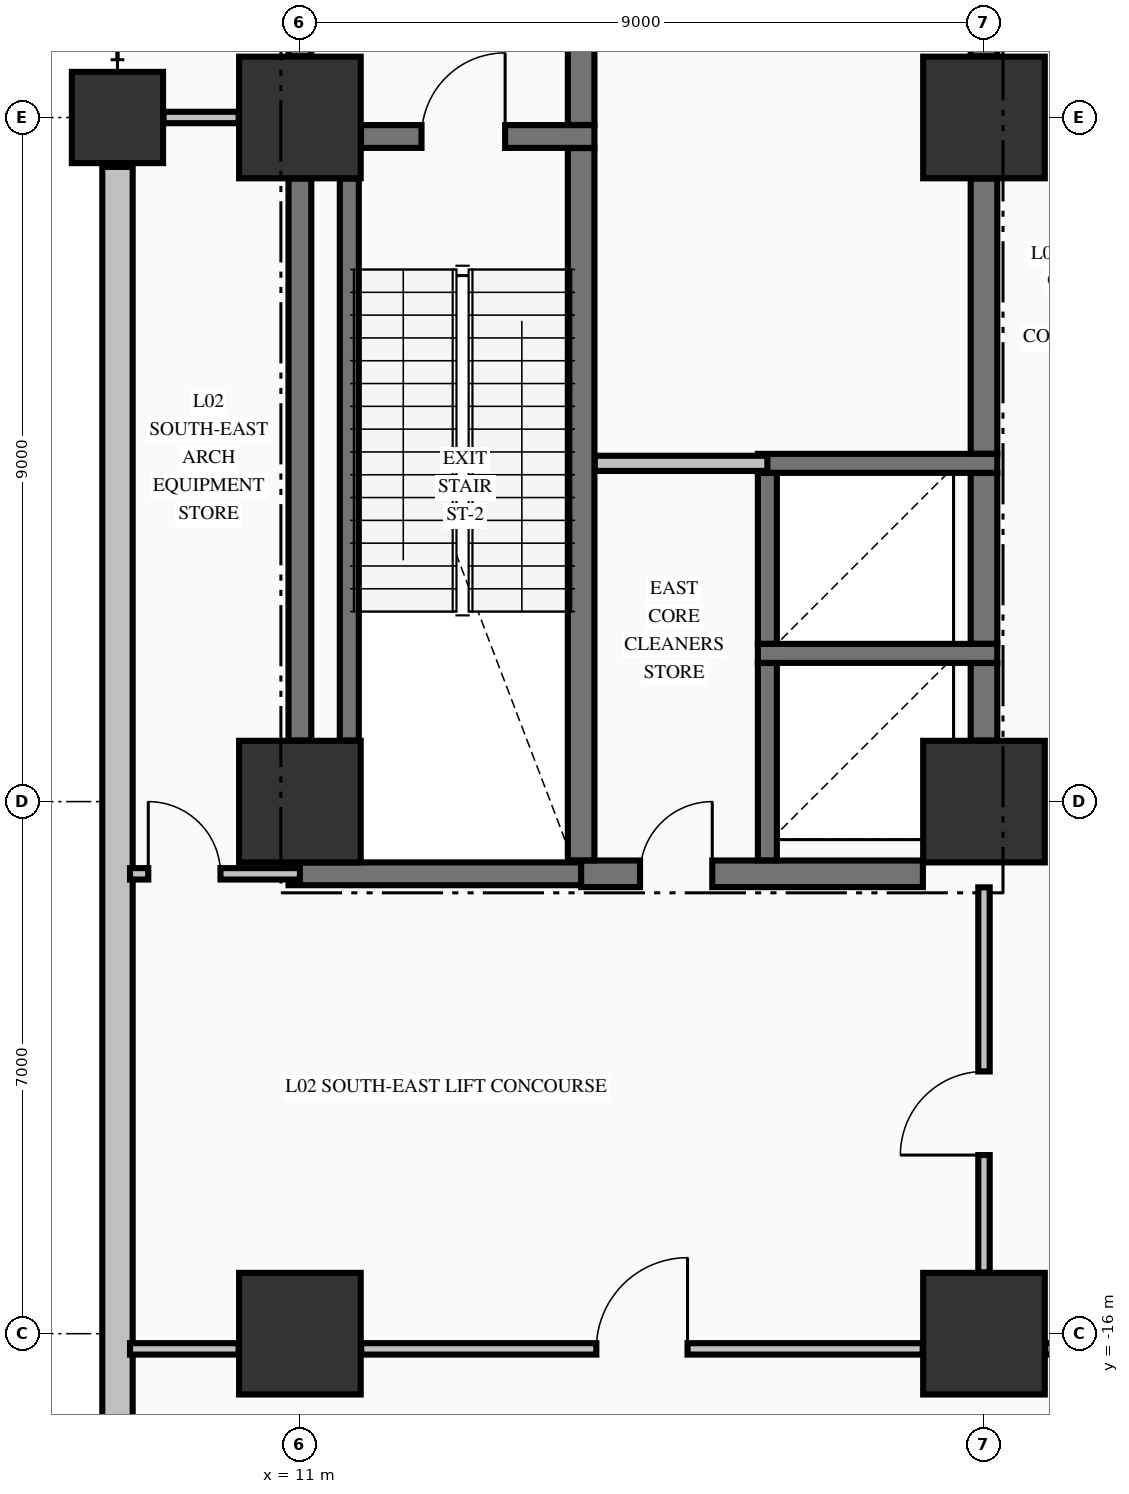
"""IFC4 building model, lengths in metres.
Left out: names, types, materials, properties, quantities, classifications, styles, units other than length and angle.
Written with IfcOpenShell. Run it as: python <this file> out.ifc"""

import sys

from ifc_helpers import new_model, si_unit, direction, frame, frame_2d, origin, origin_2d, place, context, subcontext, project, spatial, rectangle, extrude, element, fill, save


model = new_model("IFC4")
c1 = context("Model", 3, precision=1e-05, world=origin(), true_north=direction((0.0, 1.0)))
c2 = subcontext(c1, "Body", "Model", "MODEL_VIEW")
j1 = project(units=[si_unit("LENGTHUNIT", "METRE"), si_unit("PLANEANGLEUNIT", "RADIAN")], contexts=[c1])
p1 = place(None, origin())
s1 = spatial("IfcSite", under=j1, at=p1, CompositionType="ELEMENT")
p2 = place(p1, origin())
s2 = spatial("IfcBuilding", under=s1, at=p2, CompositionType="ELEMENT")
p3 = place(p2, frame((0.0, 0.0, 10.88)))
s3 = spatial("IfcBuildingStorey", under=s2, at=p3, CompositionType="ELEMENT", Elevation=10.88)
for number, where, z_axis, x_axis in (
    (1, (11.0, -16.0, 0.0), (0.0, 0.0, 1.0), (1.0, 0.0, 0.0)),
    (2, (11.0, -9.0, 0.0), (0.0, 0.0, 1.0), (1.0, 0.0, 0.0)),
    (3, (11.0, 0.0, 0.0), (0.0, 0.0, 1.0), (1.0, 0.0, 0.0)),
    (4, (20.0, -16.0, 0.0), (0.0, 0.0, 1.0), (1.0, 0.0, 0.0)),
    (5, (20.0, -9.0, 0.0), (0.0, 0.0, 1.0), (1.0, 0.0, 0.0)),
    (6, (20.0, 0.0, 0.0), (0.0, 0.0, 1.0), (1.0, 0.0, 0.0)),
):
    element("IfcColumn", number, at=place(p3, frame(where, z_axis=z_axis, x_axis=x_axis)), inside=s3, PredefinedType="COLUMN", context=c2, shape_type="SweptSolid", body=[
        extrude(rectangle(XDim=1.6, YDim=1.6, at=origin_2d()), origin(), (0.0, 0.0, 1.0), 5.09),
    ])
p4 = place(p3, frame((8.6, 0.0, 0.0), z_axis=(0.0, 0.0, 1.0), x_axis=(1.0, 0.0, 0.0)))
e7 = element("IfcColumn", 7, at=p4, inside=s3, PredefinedType="COLUMN", context=c2, shape_type="SweptSolid", body=[
    extrude(rectangle(XDim=1.2, YDim=1.2, at=origin_2d()), origin(), (0.0, 0.0, 1.0), 5.09),
])
p5 = place(p3, frame((8.6, -0.65, 0.0), z_axis=(0.0, 0.0, 1.0), x_axis=(0.0, -1.0, 0.0)))
e8 = element("IfcWall", 8, at=p5, inside=s3, PredefinedType="STANDARD", context=c2, shape_type="SweptSolid", body=[
    extrude(rectangle(XDim=24.72, YDim=0.4, at=frame_2d((12.36, 0.0))), origin(), (0.0, 0.0, 1.0), 4.132),
])
p6 = place(p3, frame((10.85, -9.95, 0.0), z_axis=(0.0, 0.0, 1.0), x_axis=(1.0, 0.0, 0.0)))
e9 = element("IfcWall", 9, at=p6, inside=s3, PredefinedType="SHEAR", context=c2, shape_type="SweptSolid", body=[
    extrude(rectangle(XDim=3.85, YDim=0.3, at=frame_2d((1.925, 0.0))), origin(), (0.0, 0.0, 1.0), 5.09),
])
p7 = place(p3, frame((14.7, -9.95, 0.0), z_axis=(0.0, 0.0, 1.0), x_axis=(1.0, 0.0, 0.0)))
e10 = element("IfcWall", 10, at=p7, inside=s3, PredefinedType="SHEAR", context=c2, shape_type="SweptSolid", body=[
    extrude(rectangle(XDim=4.496, YDim=0.35, at=frame_2d((2.248, 0.0))), origin(), (0.0, 0.0, 1.0), 5.09),
])
p8 = place(p7, frame((0.775, 0.0, 0.0)))
e11 = element("IfcOpeningElement", 11, at=p8, cuts=e10, PredefinedType="OPENING", context=c2, shape_type="SweptSolid", body=[
    extrude(rectangle(XDim=0.95, YDim=2.15, at=frame_2d((0.475, 1.075))), frame((0.0, 0.185, 0.0), z_axis=(0.0, -1.0, 0.0), x_axis=(1.0, 0.0, 0.0)), (0.0, 0.0, 1.0), 0.37),
])
for number, where, z_axis, x_axis in (
    (12, (17.025, -7.05, 0.0), (0.0, 0.0, 1.0), (1.0, 0.0, 0.0)),
    (13, (17.025, -4.55, 0.0), (0.0, 0.0, 1.0), (1.0, 0.0, 0.0)),
):
    element("IfcWall", number, at=place(p3, frame(where, z_axis=z_axis, x_axis=x_axis)), inside=s3, PredefinedType="SOLIDWALL", context=c2, shape_type="SweptSolid", body=[
        extrude(rectangle(XDim=3.15, YDim=0.25, at=frame_2d((1.575, 0.0))), origin(), (0.0, 0.0, 1.0), 5.09),
    ])
p9 = place(p3, frame((11.804, -0.25, 0.0), z_axis=(0.0, 0.0, 1.0), x_axis=(1.0, 0.0, 0.0)))
e14 = element("IfcWall", 14, at=p9, inside=s3, PredefinedType="SHEAR", context=c2, shape_type="SweptSolid", body=[
    extrude(rectangle(XDim=3.071, YDim=0.3, at=frame_2d((1.536, 0.0))), origin(), (0.0, 0.0, 1.0), 5.09),
])
p10 = place(p9, frame((0.796, 0.0, 0.0)))
e15 = element("IfcOpeningElement", 15, at=p10, cuts=e14, PredefinedType="OPENING", context=c2, shape_type="SweptSolid", body=[
    extrude(rectangle(XDim=1.1, YDim=2.15, at=frame_2d((0.55, 1.075))), frame((0.0, 0.16, 0.0), z_axis=(0.0, -1.0, 0.0), x_axis=(1.0, 0.0, 0.0)), (0.0, 0.0, 1.0), 0.32),
])
p11 = place(p3, frame((8.765, -16.2, 0.0), z_axis=(0.0, 0.0, 1.0), x_axis=(1.0, 0.0, 0.0)))
e16 = element("IfcWall", 16, at=p11, inside=s3, PredefinedType="PARTITIONING", context=c2, shape_type="SweptSolid", body=[
    extrude(rectangle(XDim=1.429, YDim=0.15, at=frame_2d((0.715, 0.0))), origin(), (0.0, 0.0, 1.0), 5.09),
])
p12 = place(p3, frame((11.806, -16.2, 0.0), z_axis=(0.0, 0.0, 1.0), x_axis=(1.0, 0.0, 0.0)))
e17 = element("IfcWall", 17, at=p12, inside=s3, PredefinedType="PARTITIONING", context=c2, shape_type="SweptSolid", body=[
    extrude(rectangle(XDim=7.388, YDim=0.15, at=frame_2d((3.694, 0.0))), origin(), (0.0, 0.0, 1.0), 4.132),
])
p13 = place(p12, frame((3.094, 0.0, 0.0)))
e18 = element("IfcOpeningElement", 18, at=p13, cuts=e17, PredefinedType="OPENING", context=c2, shape_type="SweptSolid", body=[
    extrude(rectangle(XDim=1.2, YDim=2.15, at=frame_2d((0.6, 1.075))), frame((0.0, 0.085, 0.0), z_axis=(0.0, -1.0, 0.0), x_axis=(1.0, 0.0, 0.0)), (0.0, 0.0, 1.0), 0.17),
])
p14 = place(p3, frame((20.806, -16.2, 0.0), z_axis=(0.0, 0.0, 1.0), x_axis=(1.0, 0.0, 0.0)))
e19 = element("IfcWall", 19, at=p14, inside=s3, PredefinedType="PARTITIONING", context=c2, shape_type="SweptSolid", body=[
    extrude(rectangle(XDim=4.488, YDim=0.15, at=frame_2d((2.244, 0.0))), origin(), (0.0, 0.0, 1.0), 4.132),
])
p15 = place(p14, frame((0.15, 0.0, 0.0)))
e20 = element("IfcOpeningElement", 20, at=p15, cuts=e19, PredefinedType="OPENING", context=c2, shape_type="SweptSolid", body=[
    extrude(rectangle(XDim=1.1, YDim=2.15, at=frame_2d((0.55, 1.075))), frame((0.0, 0.085, 0.0), z_axis=(0.0, -1.0, 0.0), x_axis=(1.0, 0.0, 0.0)), (0.0, 0.0, 1.0), 0.17),
])
p16 = place(p14, frame((2.844, 0.0, 0.0)))
e21 = element("IfcOpeningElement", 21, at=p16, cuts=e19, PredefinedType="OPENING", context=c2, shape_type="SweptSolid", body=[
    extrude(rectangle(XDim=1.1, YDim=2.15, at=frame_2d((0.55, 1.075))), frame((0.0, 0.085, 0.0), z_axis=(0.0, -1.0, 0.0), x_axis=(1.0, 0.0, 0.0)), (0.0, 0.0, 1.0), 0.17),
])
p17 = place(p3, frame((8.765, -9.95, 0.0), z_axis=(0.0, 0.0, 1.0), x_axis=(1.0, 0.0, 0.0)))
e22 = element("IfcWall", 22, at=p17, inside=s3, PredefinedType="PARTITIONING", context=c2, shape_type="SweptSolid", body=[
    extrude(rectangle(XDim=2.235, YDim=0.15, at=frame_2d((1.118, 0.0))), origin(), (0.0, 0.0, 1.0), 5.09),
])
p18 = place(p17, frame((0.24, 0.0, 0.0)))
e23 = element("IfcOpeningElement", 23, at=p18, cuts=e22, PredefinedType="OPENING", context=c2, shape_type="SweptSolid", body=[
    extrude(rectangle(XDim=0.95, YDim=2.15, at=frame_2d((0.475, 1.075))), frame((0.0, 0.085, 0.0), z_axis=(0.0, -1.0, 0.0), x_axis=(1.0, 0.0, 0.0)), (0.0, 0.0, 1.0), 0.17),
])
p19 = place(p3, frame((14.878, -4.55, 0.0), z_axis=(0.0, 0.0, 1.0), x_axis=(1.0, 0.0, 0.0)))
e24 = element("IfcWall", 24, at=p19, inside=s3, PredefinedType="PARTITIONING", context=c2, shape_type="SweptSolid", body=[
    extrude(rectangle(XDim=2.272, YDim=0.2, at=frame_2d((1.136, 0.0))), origin(), (0.0, 0.0, 1.0), 5.09),
])
p20 = place(p3, frame((9.206, 0.0, 0.0), z_axis=(0.0, 0.0, 1.0), x_axis=(1.0, 0.0, 0.0)))
e25 = element("IfcWall", 25, at=p20, inside=s3, PredefinedType="PARTITIONING", context=c2, shape_type="SweptSolid", body=[
    extrude(rectangle(XDim=0.988, YDim=0.15, at=frame_2d((0.494, 0.0))), origin(), (0.0, 0.0, 1.0), 4.132),
])
p21 = place(p3, frame((11.0, -8.196, 0.0), z_axis=(0.0, 0.0, 1.0), x_axis=(0.0, 1.0, 0.0)))
e26 = element("IfcWall", 26, at=p21, inside=s3, PredefinedType="SHEAR", context=c2, shape_type="SweptSolid", body=[
    extrude(rectangle(XDim=7.392, YDim=0.3, at=frame_2d((3.696, 0.0))), origin(), (0.0, 0.0, 1.0), 5.09),
])
p22 = place(p3, frame((11.0, 0.804, 0.0), z_axis=(0.0, 0.0, 1.0), x_axis=(0.0, 1.0, 0.0)))
e27 = element("IfcWall", 27, at=p22, inside=s3, PredefinedType="SHEAR", context=c2, shape_type="SweptSolid", body=[
    extrude(rectangle(XDim=1.944, YDim=0.3, at=frame_2d((0.972, 0.0))), origin(), (0.0, 0.0, 1.0), 5.09),
])
p23 = place(p22, frame((0.296, 0.0, 0.0)))
e28 = element("IfcOpeningElement", 28, at=p23, cuts=e27, PredefinedType="OPENING", context=c2, shape_type="SweptSolid", body=[
    extrude(rectangle(XDim=1.1, YDim=2.15, at=frame_2d((0.55, 1.075))), frame((0.0, 0.16, 0.0), z_axis=(0.0, -1.0, 0.0), x_axis=(1.0, 0.0, 0.0)), (0.0, 0.0, 1.0), 0.32),
])
p24 = place(p3, frame((11.65, -8.196, 0.0), z_axis=(0.0, 0.0, 1.0), x_axis=(0.0, 1.0, 0.0)))
e29 = element("IfcWall", 29, at=p24, inside=s3, PredefinedType="SOLIDWALL", context=c2, shape_type="SweptSolid", body=[
    extrude(rectangle(XDim=7.392, YDim=0.25, at=frame_2d((3.696, 0.0))), origin(), (0.0, 0.0, 1.0), 5.09),
])
p25 = place(p3, frame((14.7, -9.773, 0.0), z_axis=(0.0, 0.0, 1.0), x_axis=(0.0, 1.0, 0.0)))
e30 = element("IfcWall", 30, at=p25, inside=s3, PredefinedType="SHEAR", context=c2, shape_type="SweptSolid", body=[
    extrude(rectangle(XDim=9.371, YDim=0.35, at=frame_2d((4.686, 0.0))), origin(), (0.0, 0.0, 1.0), 5.09),
])
p26 = place(p3, frame((14.7, -0.098, 0.0), z_axis=(0.0, 0.0, 1.0), x_axis=(0.0, 1.0, 0.0)))
e31 = element("IfcWall", 31, at=p26, inside=s3, PredefinedType="SHEAR", context=c2, shape_type="SweptSolid", body=[
    extrude(rectangle(XDim=2.846, YDim=0.35, at=frame_2d((1.423, 0.0))), origin(), (0.0, 0.0, 1.0), 5.09),
])
p27 = place(p3, frame((17.15, -9.773, 0.0), z_axis=(0.0, 0.0, 1.0), x_axis=(0.0, 1.0, 0.0)))
e32 = element("IfcWall", 32, at=p27, inside=s3, PredefinedType="SOLIDWALL", context=c2, shape_type="SweptSolid", body=[
    extrude(rectangle(XDim=2.596, YDim=0.25, at=frame_2d((1.298, 0.0))), origin(), (0.0, 0.0, 1.0), 5.09),
])
p28 = place(p3, frame((17.15, -6.923, 0.0), z_axis=(0.0, 0.0, 1.0), x_axis=(0.0, 1.0, 0.0)))
e33 = element("IfcWall", 33, at=p28, inside=s3, PredefinedType="SOLIDWALL", context=c2, shape_type="SweptSolid", body=[
    extrude(rectangle(XDim=2.246, YDim=0.25, at=frame_2d((1.123, 0.0))), origin(), (0.0, 0.0, 1.0), 5.09),
])
p29 = place(p3, frame((20.0, -8.196, 0.0), z_axis=(0.0, 0.0, 1.0), x_axis=(0.0, 1.0, 0.0)))
e34 = element("IfcWall", 34, at=p29, inside=s3, PredefinedType="SHEAR", context=c2, shape_type="SweptSolid", body=[
    extrude(rectangle(XDim=1.019, YDim=0.35, at=frame_2d((0.51, 0.0))), origin(), (0.0, 0.0, 1.0), 5.09),
])
p30 = place(p3, frame((20.0, -6.923, 0.0), z_axis=(0.0, 0.0, 1.0), x_axis=(0.0, 1.0, 0.0)))
e35 = element("IfcWall", 35, at=p30, inside=s3, PredefinedType="SHEAR", context=c2, shape_type="SweptSolid", body=[
    extrude(rectangle(XDim=2.246, YDim=0.35, at=frame_2d((1.123, 0.0))), origin(), (0.0, 0.0, 1.0), 5.09),
])
p31 = place(p3, frame((20.0, -4.423, 0.0), z_axis=(0.0, 0.0, 1.0), x_axis=(0.0, 1.0, 0.0)))
e36 = element("IfcWall", 36, at=p31, inside=s3, PredefinedType="SHEAR", context=c2, shape_type="SweptSolid", body=[
    extrude(rectangle(XDim=3.619, YDim=0.35, at=frame_2d((1.81, 0.0))), origin(), (0.0, 0.0, 1.0), 5.09),
])
p32 = place(p3, frame((20.0, 0.804, 0.0), z_axis=(0.0, 0.0, 1.0), x_axis=(0.0, 1.0, 0.0)))
e37 = element("IfcWall", 37, at=p32, inside=s3, PredefinedType="SHEAR", context=c2, shape_type="SweptSolid", body=[
    extrude(rectangle(XDim=7.392, YDim=0.35, at=frame_2d((3.696, 0.0))), origin(), (0.0, 0.0, 1.0), 5.09),
])
p33 = place(p3, frame((20.0, -15.194, 0.0), z_axis=(0.0, 0.0, 1.0), x_axis=(0.0, 1.0, 0.0)))
e38 = element("IfcWall", 38, at=p33, inside=s3, PredefinedType="PARTITIONING", context=c2, shape_type="SweptSolid", body=[
    extrude(rectangle(XDim=5.066, YDim=0.15, at=frame_2d((2.533, 0.0))), origin(), (0.0, 0.0, 1.0), 4.132),
])
p34 = place(p33, frame((1.544, 0.0, 0.0)))
e39 = element("IfcOpeningElement", 39, at=p34, cuts=e38, PredefinedType="OPENING", context=c2, shape_type="SweptSolid", body=[
    extrude(rectangle(XDim=1.1, YDim=2.15, at=frame_2d((0.55, 1.075))), frame((0.0, 0.085, 0.0), z_axis=(0.0, -1.0, 0.0), x_axis=(1.0, 0.0, 0.0)), (0.0, 0.0, 1.0), 0.17),
])
p35 = place(p10, origin())
e40 = element("IfcDoor", 40, at=p35, inside=s3, OperationType="SINGLE_SWING_RIGHT", PredefinedType="DOOR", context=c2, shape_type="SweptSolid", body=[
    extrude(rectangle(XDim=1.1, YDim=2.15, at=frame_2d((0.55, 1.075))), frame((0.0, 0.025, 0.0), z_axis=(0.0, -1.0, 0.0), x_axis=(1.0, 0.0, 0.0)), (0.0, 0.0, 1.0), 0.05),
])
fill(e15, e40)
p36 = place(p8, origin())
e41 = element("IfcDoor", 41, at=p36, inside=s3, OperationType="SINGLE_SWING_RIGHT", PredefinedType="DOOR", context=c2, shape_type="SweptSolid", body=[
    extrude(rectangle(XDim=0.95, YDim=2.15, at=frame_2d((0.475, 1.075))), frame((0.0, 0.025, 0.0), z_axis=(0.0, -1.0, 0.0), x_axis=(1.0, 0.0, 0.0)), (0.0, 0.0, 1.0), 0.05),
])
fill(e11, e41)
p37 = place(p18, origin())
e42 = element("IfcDoor", 42, at=p37, inside=s3, OperationType="SINGLE_SWING_LEFT", PredefinedType="DOOR", context=c2, shape_type="SweptSolid", body=[
    extrude(rectangle(XDim=0.95, YDim=2.15, at=frame_2d((0.475, 1.075))), frame((0.0, 0.025, 0.0), z_axis=(0.0, -1.0, 0.0), x_axis=(1.0, 0.0, 0.0)), (0.0, 0.0, 1.0), 0.05),
])
fill(e23, e42)
p38 = place(p34, origin())
e43 = element("IfcDoor", 43, at=p38, inside=s3, OperationType="SINGLE_SWING_LEFT", PredefinedType="DOOR", context=c2, shape_type="SweptSolid", body=[
    extrude(rectangle(XDim=1.1, YDim=2.15, at=frame_2d((0.55, 1.075))), frame((0.0, 0.025, 0.0), z_axis=(0.0, -1.0, 0.0), x_axis=(1.0, 0.0, 0.0)), (0.0, 0.0, 1.0), 0.05),
])
fill(e39, e43)
p39 = place(p13, origin())
e44 = element("IfcDoor", 44, at=p39, inside=s3, OperationType="SINGLE_SWING_RIGHT", PredefinedType="DOOR", context=c2, shape_type="SweptSolid", body=[
    extrude(rectangle(XDim=1.2, YDim=2.15, at=frame_2d((0.6, 1.075))), frame((0.0, 0.025, 0.0), z_axis=(0.0, -1.0, 0.0), x_axis=(1.0, 0.0, 0.0)), (0.0, 0.0, 1.0), 0.05),
])
fill(e18, e44)
save(model, sys.argv[1])
